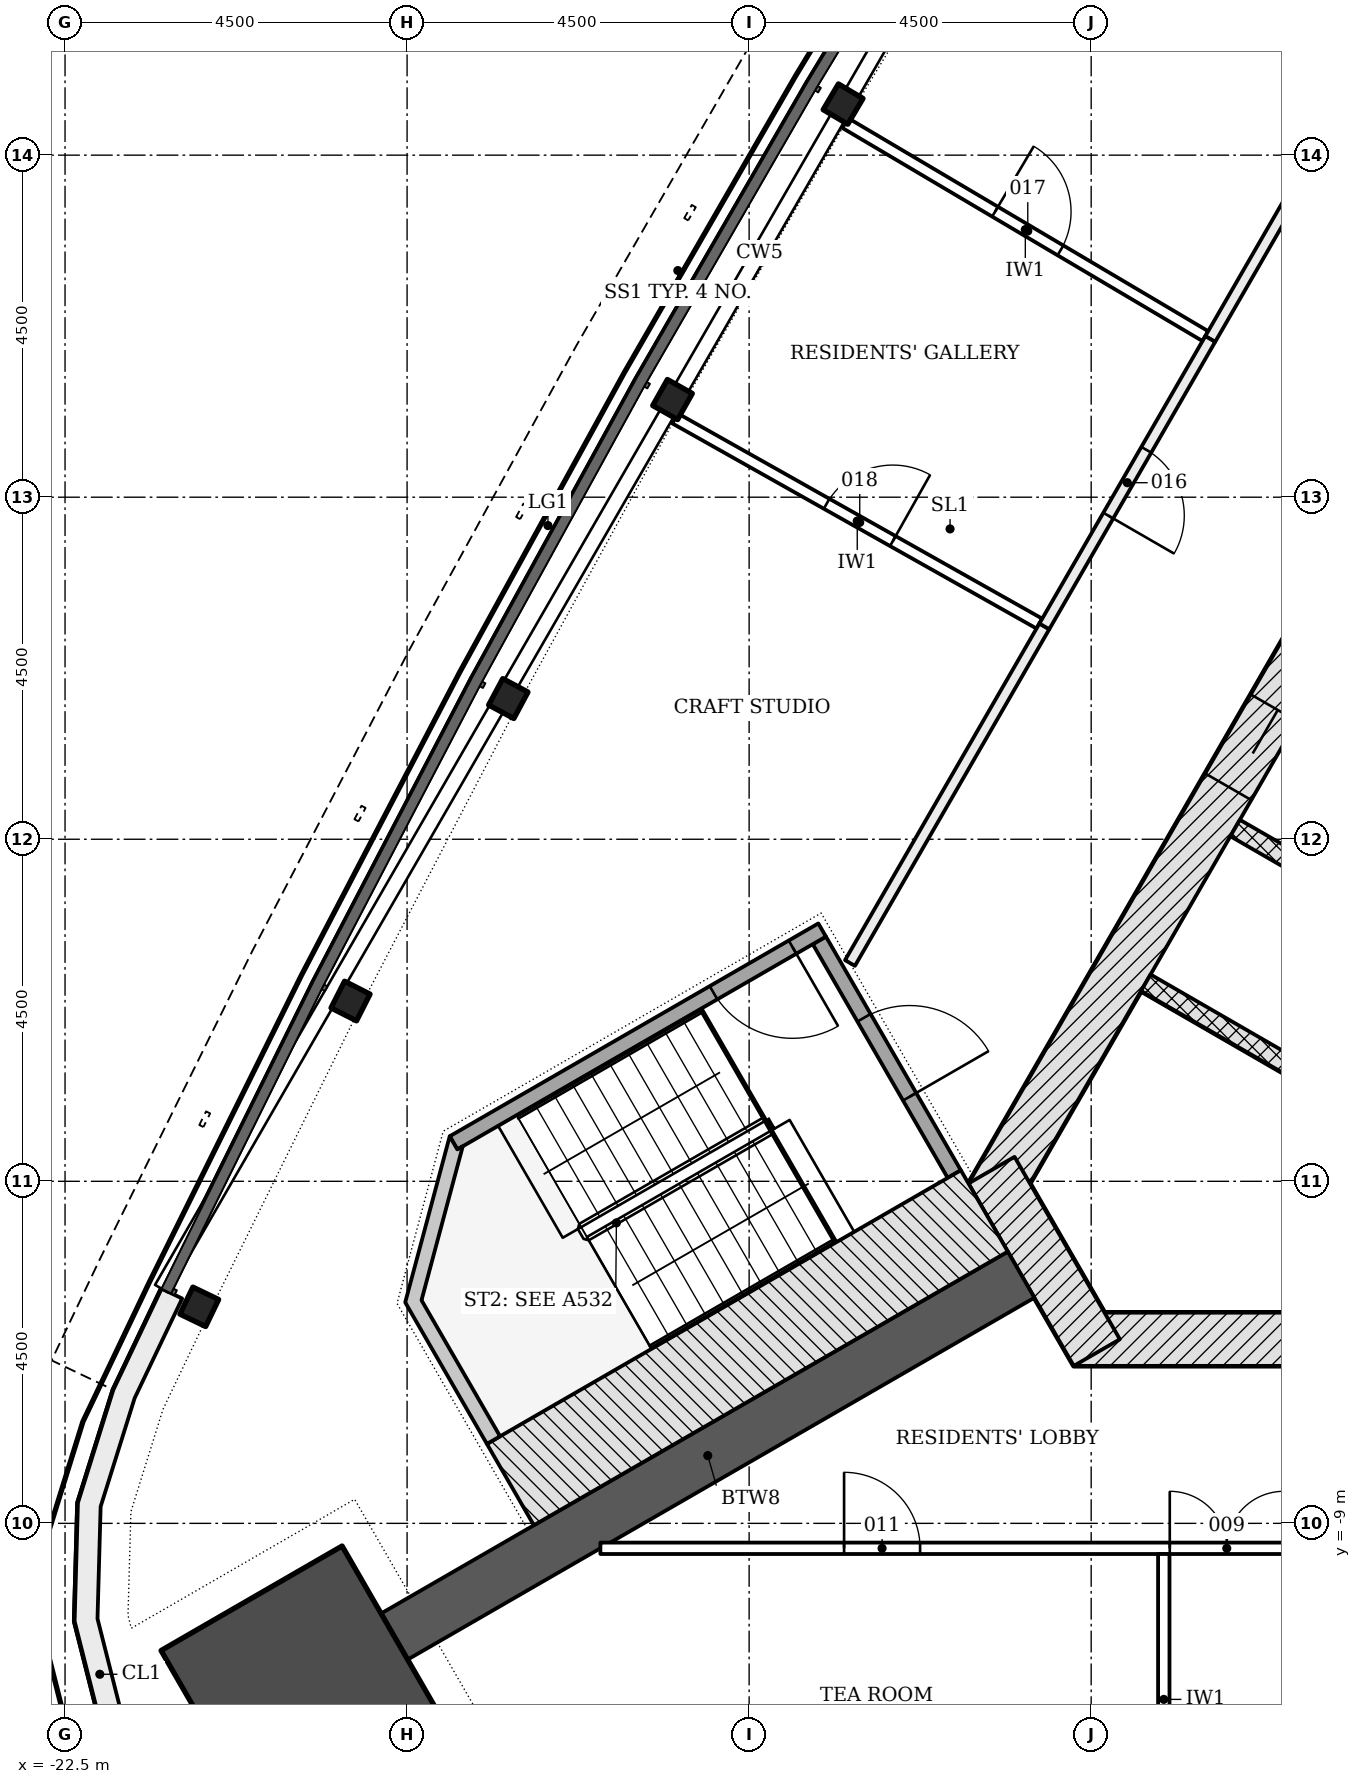
"""IFC4 building model, lengths in metres.
Left out: names, types, materials, properties, quantities, classifications, styles, units other than length and angle.
Written with IfcOpenShell. Run it as: python <this file> out.ifc"""

import sys

from ifc_helpers import new_model, si_unit, direction, frame, frame_2d, origin, origin_2d, place, context, subcontext, project, spatial, polyline, rectangle, i_section, outline, extrude, element, fill, save


model = new_model("IFC4")
c1 = context("Model", 3, precision=1e-05, world=origin(), true_north=direction((0.0, 1.0)))
c2 = subcontext(c1, "Body", "Model", "MODEL_VIEW")
j1 = project(units=[si_unit("LENGTHUNIT", "METRE"), si_unit("PLANEANGLEUNIT", "RADIAN")], contexts=[c1])
p1 = place(None, origin())
s1 = spatial("IfcSite", under=j1, at=p1, CompositionType="ELEMENT")
p2 = place(p1, origin())
s2 = spatial("IfcBuilding", under=s1, at=p2, CompositionType="ELEMENT")
p3 = place(p2, frame((0.0, 0.0, 185.1)))
s3 = spatial("IfcBuildingStorey", under=s2, at=p3, CompositionType="ELEMENT", Elevation=185.1)
p4 = place(p3, frame((-9.229, -6.578, -0.2), z_axis=(0.0, 0.0, 1.0), x_axis=(1.0, 0.0, 0.0)))
e1 = element("IfcWall", 1, at=p4, inside=s3, PredefinedType="SHEAR", context=c2, shape_type="SweptSolid", body=[
    extrude(rectangle(XDim=18.458, YDim=0.7, at=frame_2d((9.229, 0.0))), origin(), (0.0, 0.0, 1.0), 3.6),
])
p5 = place(p4, frame((9.5, 0.0, 0.2)))
e2 = element("IfcOpeningElement", 2, at=p5, cuts=e1, PredefinedType="OPENING", context=c2, shape_type="SweptSolid", body=[
    extrude(rectangle(XDim=1.0, YDim=2.1, at=frame_2d((0.5, 1.05))), frame((0.0, 0.36, 0.0), z_axis=(0.0, -1.0, 0.0), x_axis=(1.0, 0.0, 0.0)), (0.0, 0.0, 1.0), 0.72),
])
p6 = place(p4, frame((4.402, 0.0, 0.2)))
e3 = element("IfcOpeningElement", 3, at=p6, cuts=e1, PredefinedType="OPENING", context=c2, shape_type="SweptSolid", body=[
    extrude(rectangle(XDim=0.9, YDim=2.1, at=frame_2d((0.45, 1.05))), frame((0.0, 0.36, 0.0), z_axis=(0.0, -1.0, 0.0), x_axis=(1.0, 0.0, 0.0)), (0.0, 0.0, 1.0), 0.72),
])
p7 = place(p4, frame((13.927, 0.0, 0.2)))
e4 = element("IfcOpeningElement", 4, at=p7, cuts=e1, PredefinedType="OPENING", context=c2, shape_type="SweptSolid", body=[
    extrude(rectangle(XDim=0.9, YDim=2.1, at=frame_2d((0.45, 1.05))), frame((0.0, 0.36, 0.0), z_axis=(0.0, -1.0, 0.0), x_axis=(1.0, 0.0, 0.0)), (0.0, 0.0, 1.0), 0.72),
])
p8 = place(p3, frame((-1.083, 11.281, -0.2), z_axis=(0.0, 0.0, 1.0), x_axis=(-0.500001446645, -0.866024568562, 0.0)))
e5 = element("IfcWall", 5, at=p8, inside=s3, PredefinedType="SHEAR", context=c2, shape_type="SweptSolid", body=[
    extrude(rectangle(XDim=18.458, YDim=0.7, at=frame_2d((9.229, 0.0))), origin(), (0.0, 0.0, 1.0), 3.6),
])
p9 = place(p8, frame((8.979, 0.0, 0.2)))
e6 = element("IfcOpeningElement", 6, at=p9, cuts=e5, PredefinedType="OPENING", context=c2, shape_type="SweptSolid", body=[
    extrude(rectangle(XDim=1.2, YDim=2.1, at=frame_2d((0.6, 1.05))), frame((0.0, 0.36, 0.0), z_axis=(0.0, -1.0, 0.0), x_axis=(1.0, 0.0, 0.0)), (0.0, 0.0, 1.0), 0.72),
])
p10 = place(p8, frame((11.029, 0.0, 0.2)))
e7 = element("IfcOpeningElement", 7, at=p10, cuts=e5, PredefinedType="OPENING", context=c2, shape_type="SweptSolid", body=[
    extrude(rectangle(XDim=1.2, YDim=2.1, at=frame_2d((0.6, 1.05))), frame((0.0, 0.36, 0.0), z_axis=(0.0, -1.0, 0.0), x_axis=(1.0, 0.0, 0.0)), (0.0, 0.0, 1.0), 0.72),
])
p11 = place(p3, frame((-10.311, -4.353, -0.2), z_axis=(0.0, 0.0, 1.0), x_axis=(0.500042739161, -0.866000726912, 0.0)))
e8 = element("IfcWall", 8, at=p11, inside=s3, PredefinedType="SHEAR", context=c2, shape_type="SweptSolid", body=[
    extrude(rectangle(XDim=2.771, YDim=0.7, at=frame_2d((1.386, 0.0))), origin(), (0.0, 0.0, 1.0), 3.6),
])
p12 = place(p3, frame((-9.922, -5.728, -0.2), z_axis=(0.0, 0.0, 1.0), x_axis=(-0.866025463095, -0.499999897272, 0.0)))
e9 = element("IfcWall", 9, at=p12, inside=s3, PredefinedType="SHEAR", context=c2, shape_type="SweptSolid", body=[
    extrude(rectangle(XDim=9.521, YDim=0.7, at=frame_2d((4.761, 0.0))), origin(), (0.0, 0.0, 1.0), 3.6),
])
p13 = place(p3, frame((-19.358, -11.177, -0.2), z_axis=(0.0, 0.0, 1.0), x_axis=(-0.866025403784, -0.5, 0.0)))
e10 = element("IfcColumn", 10, at=p13, inside=s3, PredefinedType="COLUMN", context=c2, shape_type="SweptSolid", body=[
    extrude(rectangle(XDim=2.75, YDim=2.75, at=origin_2d()), origin(), (0.0, 0.0, 1.0), 3.6),
])
for number, where, z_axis, x_axis in (
    (11, (-12.264, 9.672, -0.2), (0.0, 0.0, 1.0), (-0.509, -0.861, 0.0)),
    (12, (-14.508, 5.785, -0.2), (0.0, 0.0, 1.0), (-0.491, -0.871, 0.0)),
    (13, (-16.668, 1.851, -0.2), (0.0, 0.0, 1.0), (-0.472, -0.882, 0.0)),
    (14, (-18.744, -2.128, -0.2), (0.0, 0.0, 1.0), (-0.453, -0.892, 0.0)),
    (15, (-20.734, -6.151, -0.2), (0.0, 0.0, 1.0), (-0.434, -0.901, 0.0)),
):
    element("IfcColumn", number, at=place(p3, frame(where, z_axis=z_axis, x_axis=x_axis)), inside=s3, PredefinedType="COLUMN", context=c2, shape_type="SweptSolid", body=[
        extrude(i_section(OverallWidth=0.394, OverallDepth=0.376, WebThickness=0.017, FlangeThickness=0.028, FilletRadius=0.015, at=origin_2d()), origin(), (0.0, 0.0, 1.0), 3.6),
    ])
p14 = place(p3, origin())
e16 = element("IfcWall", 16, at=p14, inside=s3, PredefinedType="NOTDEFINED", context=c2, shape_type="SweptSolid", body=[
    extrude(outline(polyline([(-21.229, -5.913), (-21.865, -7.243), (-22.33, -8.73), (-22.374, -10.287), (-21.992, -11.798), (-21.213, -13.147), (-20.096, -14.233), (-18.726, -14.974), (-17.205, -15.313), (-15.735, -15.429), (-15.712, -15.13), (-17.16, -15.016), (-18.619, -14.69), (-19.917, -13.989), (-20.974, -12.961), (-21.711, -11.684), (-22.073, -10.254), (-22.032, -8.78), (-21.584, -7.353), (-20.959, -6.042), (-21.229, -5.913)])), origin(), (0.0, 0.0, 1.0), 3.3),
])
for number, where, z_axis, x_axis in (
    (17, (-7.106, 0.148, -0.2), (0.0, 0.0, 1.0), (0.866, -0.5, 0.0)),
    (18, (-8.281, -1.887, -0.2), (0.0, 0.0, 1.0), (0.866, -0.5, 0.0)),
):
    element("IfcWall", number, at=place(p3, frame(where, z_axis=z_axis, x_axis=x_axis)), inside=s3, PredefinedType="PARTITIONING", context=c2, shape_type="SweptSolid", body=[
        extrude(rectangle(XDim=2.9, YDim=0.25, at=frame_2d((1.45, 0.0))), origin(), (0.0, 0.0, 1.0), 3.6),
    ])
p15 = place(p3, frame((-12.576, -1.331, -0.2), z_axis=(0.0, 0.0, 1.0), x_axis=(0.499970499736, -0.8660424351, 0.0)))
e19 = element("IfcWall", 19, at=p15, inside=s3, PredefinedType="SHEAR", context=c2, shape_type="SweptSolid", body=[
    extrude(rectangle(XDim=3.55, YDim=0.2, at=frame_2d((1.775, 0.0))), origin(), (0.0, 0.0, 1.0), 3.6),
])
p16 = place(p15, frame((1.175, 0.0, 0.2)))
e20 = element("IfcOpeningElement", 20, at=p16, cuts=e19, PredefinedType="OPENING", context=c2, shape_type="SweptSolid", body=[
    extrude(rectangle(XDim=1.2, YDim=2.1, at=frame_2d((0.6, 1.05))), frame((0.0, 0.11, 0.0), z_axis=(0.0, -1.0, 0.0), x_axis=(1.0, 0.0, 0.0)), (0.0, 0.0, 1.0), 0.22),
])
p17 = place(p3, frame((-12.539, -1.194, -0.2), z_axis=(0.0, 0.0, 1.0), x_axis=(-0.866045472092, -0.499965239061, 0.0)))
e21 = element("IfcWall", 21, at=p17, inside=s3, PredefinedType="SHEAR", context=c2, shape_type="SweptSolid", body=[
    extrude(rectangle(XDim=5.6, YDim=0.2, at=frame_2d((2.8, 0.0))), origin(), (0.0, 0.0, 1.0), 3.6),
])
p18 = place(p17, frame((0.45, 0.0, 0.2)))
e22 = element("IfcOpeningElement", 22, at=p18, cuts=e21, PredefinedType="OPENING", context=c2, shape_type="SweptSolid", body=[
    extrude(rectangle(XDim=1.2, YDim=2.1, at=frame_2d((0.6, 1.05))), frame((0.0, 0.11, 0.0), z_axis=(0.0, -1.0, 0.0), x_axis=(1.0, 0.0, 0.0)), (0.0, 0.0, 1.0), 0.22),
])
p19 = place(p3, frame((-10.406, -4.89, -0.2), z_axis=(0.0, 0.0, 1.0), x_axis=(-0.866018442252, -0.500012057535, 0.0)))
e23 = element("IfcWall", 23, at=p19, inside=s3, PredefinedType="SHEAR", context=c2, shape_type="SweptSolid", body=[
    extrude(rectangle(XDim=7.2, YDim=1.236, at=frame_2d((3.6, 0.0))), origin(), (0.0, 0.0, 1.0), 3.6),
])
p20 = place(p3, frame((0.0, 0.0, -0.2)))
e24 = element("IfcWall", 24, at=p20, inside=s3, PredefinedType="SHEAR", context=c2, shape_type="SweptSolid", body=[
    extrude(outline(polyline([(-17.439, -3.907), (-18.025, -6.093), (-16.95, -7.955), (-16.777, -7.855), (-17.81, -6.065), (-17.267, -4.039), (-17.339, -4.081), (-17.339, -4.081), (-17.339, -4.081), (-17.339, -4.081), (-17.339, -4.081), (-17.339, -4.081), (-17.339, -4.081), (-17.339, -4.081), (-17.339, -4.081), (-17.339, -4.081), (-17.339, -4.081), (-17.339, -4.081), (-17.339, -4.081), (-17.339, -4.081), (-17.339, -4.081), (-17.339, -4.081), (-17.339, -4.081), (-17.439, -3.907)])), origin(), (0.0, 0.0, 1.0), 3.6),
])
p21 = place(p3, frame((-15.457, -9.328, 0.0), z_axis=(0.0, 0.0, 1.0), x_axis=(1.0, 0.0, 0.0)))
e25 = element("IfcWall", 25, at=p21, inside=s3, PredefinedType="PARTITIONING", context=c2, shape_type="SweptSolid", body=[
    extrude(rectangle(XDim=9.12, YDim=0.15, at=frame_2d((4.56, 0.0))), origin(), (0.0, 0.0, 1.0), 2.847),
])
p22 = place(p21, frame((7.491, 0.0, 0.0)))
e26 = element("IfcOpeningElement", 26, at=p22, cuts=e25, PredefinedType="OPENING", context=c2, shape_type="SweptSolid", body=[
    extrude(rectangle(XDim=1.5, YDim=2.1, at=frame_2d((0.75, 1.05))), frame((0.0, 0.085, 0.0), z_axis=(0.0, -1.0, 0.0), x_axis=(1.0, 0.0, 0.0)), (0.0, 0.0, 1.0), 0.17),
])
p23 = place(p21, frame((3.206, 0.0, 0.0)))
e27 = element("IfcOpeningElement", 27, at=p23, cuts=e25, PredefinedType="OPENING", context=c2, shape_type="SweptSolid", body=[
    extrude(rectangle(XDim=1.0, YDim=2.1, at=frame_2d((0.5, 1.05))), frame((0.0, 0.085, 0.0), z_axis=(0.0, -1.0, 0.0), x_axis=(1.0, 0.0, 0.0)), (0.0, 0.0, 1.0), 0.17),
])
p24 = place(p3, frame((-8.045, -9.403, 0.0), z_axis=(0.0, 0.0, 1.0), x_axis=(0.0, -1.0, 0.0)))
e28 = element("IfcWall", 28, at=p24, inside=s3, PredefinedType="PARTITIONING", context=c2, shape_type="SweptSolid", body=[
    extrude(rectangle(XDim=3.825, YDim=0.15, at=frame_2d((1.913, 0.0))), origin(), (0.0, 0.0, 1.0), 3.4),
])
p25 = place(p3, frame((-0.35, 18.85, 0.0), z_axis=(0.0, 0.0, 1.0), x_axis=(-0.500005388685, -0.866022292603, 0.0)))
e29 = element("IfcWall", 29, at=p25, inside=s3, PredefinedType="PARTITIONING", context=c2, shape_type="SweptSolid", body=[
    extrude(rectangle(XDim=14.167, YDim=0.15, at=frame_2d((7.083, 0.0))), origin(), (0.0, 0.0, 1.0), 2.847),
])
p26 = place(p3, frame((-9.616, 2.801, 0.0), z_axis=(0.0, 0.0, 1.0), x_axis=(-0.499995206172, -0.866028171485, 0.0)))
e30 = element("IfcWall", 30, at=p26, inside=s3, PredefinedType="PARTITIONING", context=c2, shape_type="SweptSolid", body=[
    extrude(rectangle(XDim=5.114, YDim=0.15, at=frame_2d((2.557, 0.0))), origin(), (0.0, 0.0, 1.0), 2.852),
])
p27 = place(p3, frame((-12.235, 9.422, 0.0), z_axis=(0.0, 0.0, 1.0), x_axis=(0.860631434237, -0.509228371562, 0.0)))
e31 = element("IfcWall", 31, at=p27, inside=s3, PredefinedType="PARTITIONING", context=c2, shape_type="SweptSolid", body=[
    extrude(rectangle(XDim=5.504, YDim=0.15, at=frame_2d((2.752, 0.0))), origin(), (0.0, 0.0, 1.0), 3.4),
])
p28 = place(p27, frame((2.29, 0.0, 0.0)))
e32 = element("IfcOpeningElement", 32, at=p28, cuts=e31, PredefinedType="OPENING", context=c2, shape_type="SweptSolid", body=[
    extrude(rectangle(XDim=1.0, YDim=2.1, at=frame_2d((0.5, 1.05))), frame((0.0, 0.085, 0.0), z_axis=(0.0, -1.0, 0.0), x_axis=(1.0, 0.0, 0.0)), (0.0, 0.0, 1.0), 0.17),
])
p29 = place(p3, frame((-14.474, 5.536, 0.0), z_axis=(0.0, 0.0, 1.0), x_axis=(0.871324088074, -0.490707992132, 0.0)))
e33 = element("IfcWall", 33, at=p29, inside=s3, PredefinedType="PARTITIONING", context=c2, shape_type="SweptSolid", body=[
    extrude(rectangle(XDim=5.5, YDim=0.15, at=frame_2d((2.75, 0.0))), origin(), (0.0, 0.0, 1.0), 3.4),
])
p30 = place(p29, frame((2.287, 0.0, 0.0)))
e34 = element("IfcOpeningElement", 34, at=p30, cuts=e33, PredefinedType="OPENING", context=c2, shape_type="SweptSolid", body=[
    extrude(rectangle(XDim=1.0, YDim=2.1, at=frame_2d((0.5, 1.05))), frame((0.0, 0.085, 0.0), z_axis=(0.0, -1.0, 0.0), x_axis=(1.0, 0.0, 0.0)), (0.0, 0.0, 1.0), 0.17),
])
p31 = place(p3, frame((-7.434, 6.581, 0.0), z_axis=(0.0, 0.0, 1.0), x_axis=(-0.499964504253, -0.866045896294, 0.0)))
e35 = element("IfcWall", 35, at=p31, inside=s3, PredefinedType="PARTITIONING", context=c2, shape_type="SweptSolid", body=[
    extrude(rectangle(XDim=4.365, YDim=0.15, at=frame_2d((2.183, 0.0))), origin(), (0.0, 0.0, 1.0), 2.847),
])
p32 = place(p31, frame((1.683, 0.0, 0.0)))
e36 = element("IfcOpeningElement", 36, at=p32, cuts=e35, PredefinedType="OPENING", context=c2, shape_type="SweptSolid", body=[
    extrude(rectangle(XDim=1.0, YDim=2.1, at=frame_2d((0.5, 1.05))), frame((0.0, 0.085, 0.0), z_axis=(0.0, -1.0, 0.0), x_axis=(1.0, 0.0, 0.0)), (0.0, 0.0, 1.0), 0.17),
])
p33 = place(p10, origin())
e37 = element("IfcDoor", 37, at=p33, inside=s3, OperationType="DOUBLE_DOOR_SLIDING", PredefinedType="DOOR", context=c2, shape_type="SweptSolid", body=[
    extrude(rectangle(XDim=1.2, YDim=2.1, at=frame_2d((0.6, 1.05))), frame((0.0, 0.025, 0.0), z_axis=(0.0, -1.0, 0.0), x_axis=(1.0, 0.0, 0.0)), (0.0, 0.0, 1.0), 0.05),
])
fill(e7, e37)
p34 = place(p16, origin())
e38 = element("IfcDoor", 38, at=p34, inside=s3, OperationType="SINGLE_SWING_RIGHT", PredefinedType="DOOR", context=c2, shape_type="SweptSolid", body=[
    extrude(rectangle(XDim=1.2, YDim=2.1, at=frame_2d((0.6, 1.05))), frame((0.0, 0.025, 0.0), z_axis=(0.0, -1.0, 0.0), x_axis=(1.0, 0.0, 0.0)), (0.0, 0.0, 1.0), 0.05),
])
fill(e20, e38)
p35 = place(p18, origin())
e39 = element("IfcDoor", 39, at=p35, inside=s3, OperationType="SINGLE_SWING_LEFT", PredefinedType="DOOR", context=c2, shape_type="SweptSolid", body=[
    extrude(rectangle(XDim=1.2, YDim=2.1, at=frame_2d((0.6, 1.05))), frame((0.0, 0.025, 0.0), z_axis=(0.0, -1.0, 0.0), x_axis=(1.0, 0.0, 0.0)), (0.0, 0.0, 1.0), 0.05),
])
fill(e22, e39)
p36 = place(p22, origin())
e40 = element("IfcDoor", 40, at=p36, inside=s3, OperationType="DOUBLE_DOOR_SINGLE_SWING", PredefinedType="DOOR", context=c2, shape_type="SweptSolid", body=[
    extrude(rectangle(XDim=1.5, YDim=2.1, at=frame_2d((0.75, 1.05))), frame((0.0, 0.025, 0.0), z_axis=(0.0, -1.0, 0.0), x_axis=(1.0, 0.0, 0.0)), (0.0, 0.0, 1.0), 0.05),
])
fill(e26, e40)
p37 = place(p23, origin())
e41 = element("IfcDoor", 41, at=p37, inside=s3, OperationType="SINGLE_SWING_LEFT", PredefinedType="DOOR", context=c2, shape_type="SweptSolid", body=[
    extrude(rectangle(XDim=1.0, YDim=2.1, at=frame_2d((0.5, 1.05))), frame((0.0, 0.025, 0.0), z_axis=(0.0, -1.0, 0.0), x_axis=(1.0, 0.0, 0.0)), (0.0, 0.0, 1.0), 0.05),
])
fill(e27, e41)
p38 = place(p32, origin())
e42 = element("IfcDoor", 42, at=p38, inside=s3, OperationType="SINGLE_SWING_RIGHT", PredefinedType="DOOR", context=c2, shape_type="SweptSolid", body=[
    extrude(rectangle(XDim=1.0, YDim=2.1, at=frame_2d((0.5, 1.05))), frame((0.0, 0.025, 0.0), z_axis=(0.0, -1.0, 0.0), x_axis=(1.0, 0.0, 0.0)), (0.0, 0.0, 1.0), 0.05),
])
fill(e36, e42)
p39 = place(p28, origin())
e43 = element("IfcDoor", 43, at=p39, inside=s3, OperationType="SINGLE_SWING_LEFT", PredefinedType="DOOR", context=c2, shape_type="SweptSolid", body=[
    extrude(rectangle(XDim=1.0, YDim=2.1, at=frame_2d((0.5, 1.05))), frame((0.0, 0.025, 0.0), z_axis=(0.0, -1.0, 0.0), x_axis=(1.0, 0.0, 0.0)), (0.0, 0.0, 1.0), 0.05),
])
fill(e32, e43)
p40 = place(p30, origin())
e44 = element("IfcDoor", 44, at=p40, inside=s3, OperationType="SINGLE_SWING_RIGHT", PredefinedType="DOOR", context=c2, shape_type="SweptSolid", body=[
    extrude(rectangle(XDim=1.0, YDim=2.1, at=frame_2d((0.5, 1.05))), frame((0.0, 0.025, 0.0), z_axis=(0.0, -1.0, 0.0), x_axis=(1.0, 0.0, 0.0)), (0.0, 0.0, 1.0), 0.05),
])
fill(e34, e44)
save(model, sys.argv[1])
